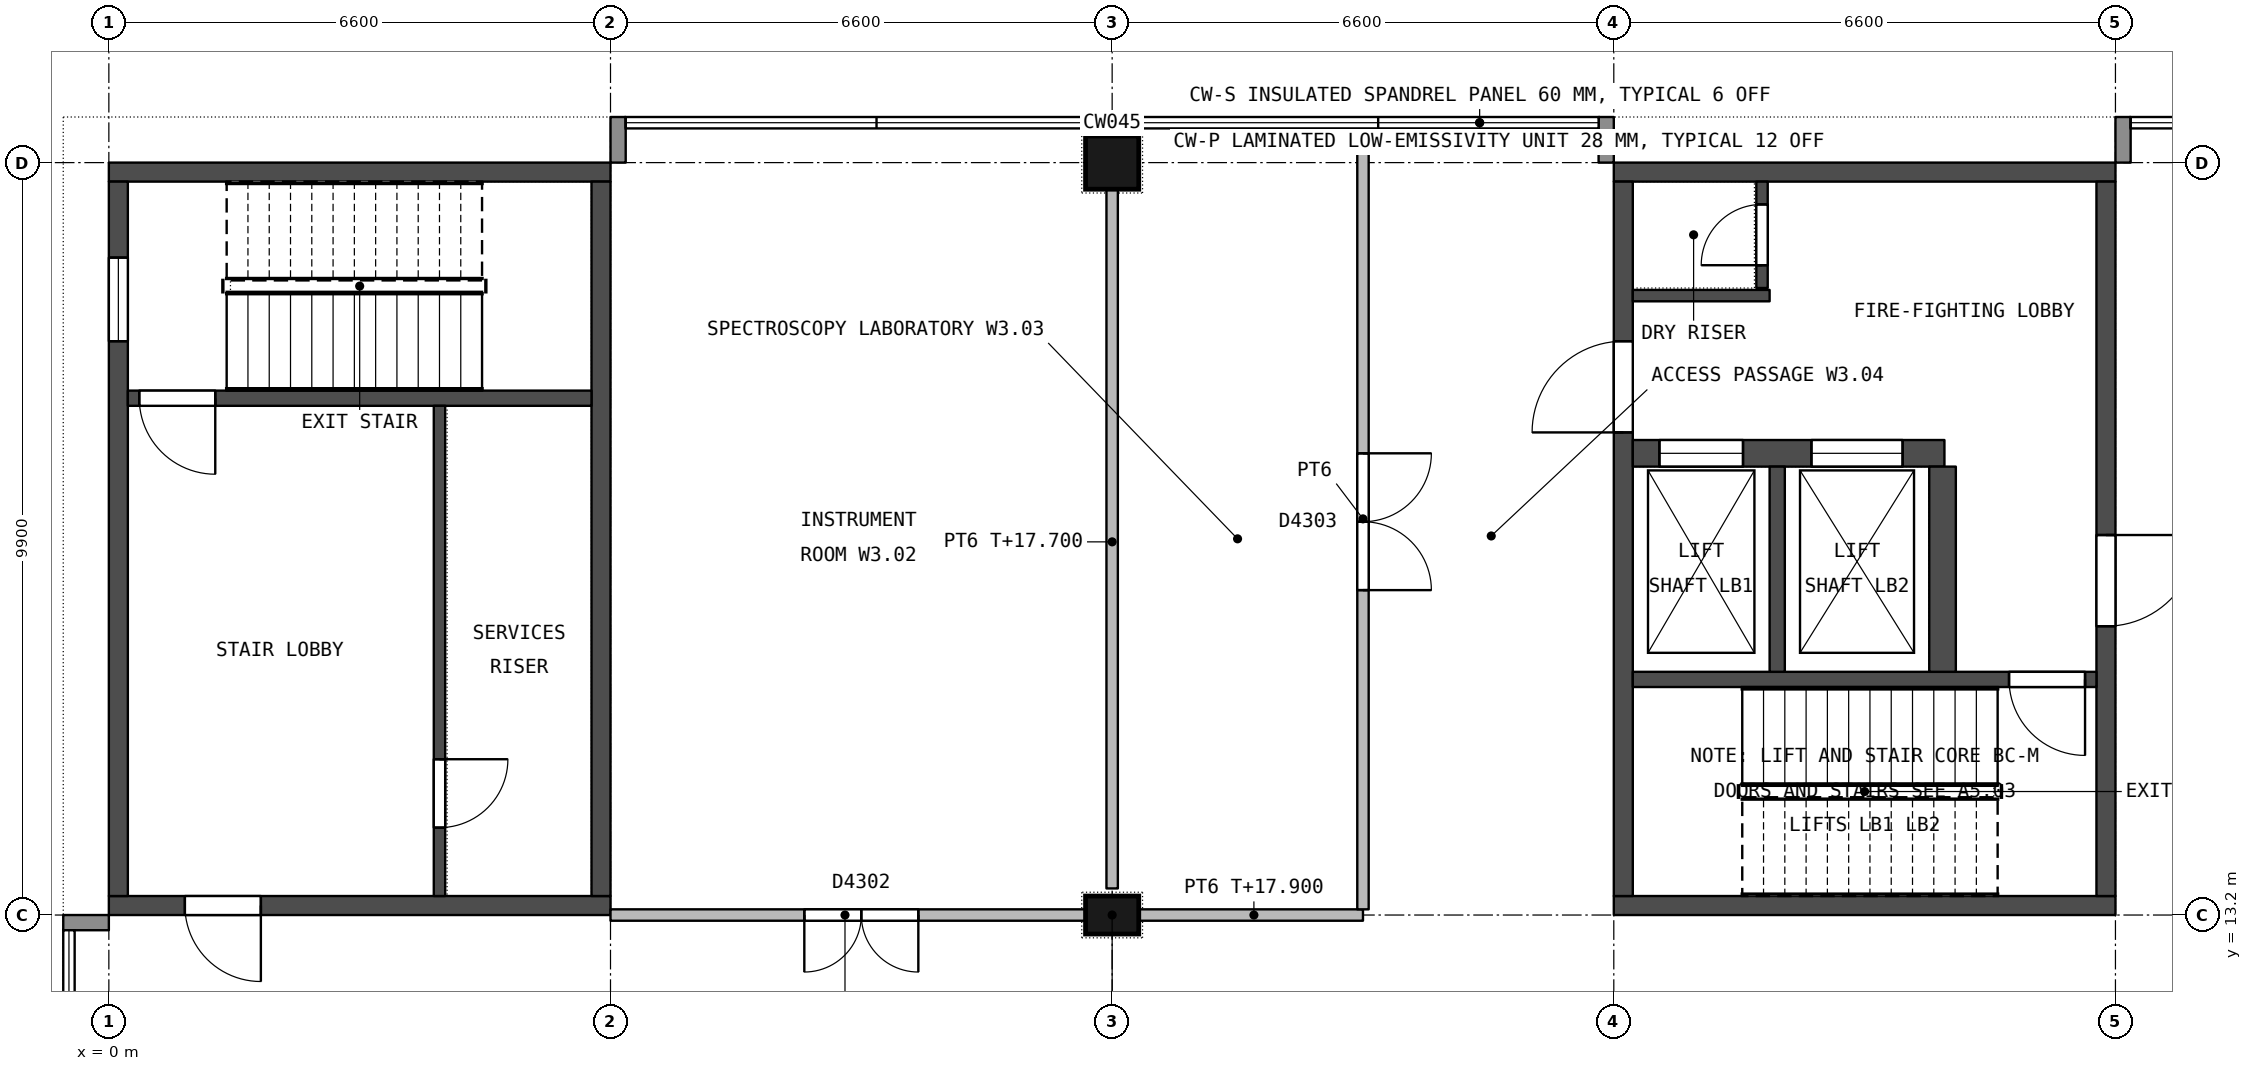
"""IFC4 building model, lengths in metres.
Left out: names, types, materials, properties, quantities, classifications, styles, units other than length and angle.
Written with IfcOpenShell. Run it as: python <this file> out.ifc"""

import sys

from ifc_helpers import new_model, si_unit, direction, frame, frame_2d, origin, origin_2d, place, context, subcontext, project, spatial, rectangle, extrude, element, fill, save


model = new_model("IFC4")
c1 = context("Model", 3, precision=1e-05, world=origin(), true_north=direction((0.0, 1.0)))
c2 = subcontext(c1, "Body", "Model", "MODEL_VIEW")
j1 = project(units=[si_unit("LENGTHUNIT", "METRE"), si_unit("PLANEANGLEUNIT", "RADIAN")], contexts=[c1])
p1 = place(None, origin())
s1 = spatial("IfcSite", under=j1, at=p1, CompositionType="ELEMENT")
p2 = place(p1, origin())
s2 = spatial("IfcBuilding", under=s1, at=p2, CompositionType="ELEMENT")
p3 = place(p2, frame((0.0, 0.0, 14.4)))
s3 = spatial("IfcBuildingStorey", under=s2, at=p3, CompositionType="ELEMENT", Elevation=14.4)
p4 = place(p3, frame((13.2, 13.2, 0.0), z_axis=(0.0, 0.0, 1.0), x_axis=(1.0, 0.0, 0.0)))
e1 = element("IfcColumn", 1, at=p4, inside=s3, PredefinedType="COLUMN", context=c2, shape_type="SweptSolid", body=[
    extrude(rectangle(XDim=0.7, YDim=0.5, at=origin_2d()), origin(), (0.0, 0.0, 1.0), 4.5),
])
p5 = place(p3, frame((13.2, 23.1, 0.0), z_axis=(0.0, 0.0, 1.0), x_axis=(1.0, 0.0, 0.0)))
e2 = element("IfcColumn", 2, at=p5, inside=s3, PredefinedType="COLUMN", context=c2, shape_type="SweptSolid", body=[
    extrude(rectangle(XDim=0.7, YDim=0.7, at=origin_2d()), origin(), (0.0, 0.0, 1.0), 4.5),
])
p6 = place(p3, frame((0.0, 13.325, 0.0), z_axis=(0.0, 0.0, 1.0), x_axis=(1.0, 0.0, 0.0)))
e3 = element("IfcWall", 3, at=p6, inside=s3, PredefinedType="SHEAR", context=c2, shape_type="SweptSolid", body=[
    extrude(rectangle(XDim=6.6, YDim=0.25, at=frame_2d((3.3, 0.0))), origin(), (0.0, 0.0, 1.0), 4.2),
])
p7 = place(p6, frame((1.0, 0.0, 0.0)))
e4 = element("IfcOpeningElement", 4, at=p7, cuts=e3, PredefinedType="OPENING", context=c2, shape_type="SweptSolid", body=[
    extrude(rectangle(XDim=1.0, YDim=2.1, at=frame_2d((0.5, 1.05))), frame((0.0, 0.135, 0.0), z_axis=(0.0, -1.0, 0.0), x_axis=(1.0, 0.0, 0.0)), (0.0, 0.0, 1.0), 0.27),
])
p8 = place(p3, frame((0.0, 22.975, 0.0), z_axis=(0.0, 0.0, 1.0), x_axis=(1.0, 0.0, 0.0)))
e5 = element("IfcWall", 5, at=p8, inside=s3, PredefinedType="SHEAR", context=c2, shape_type="SweptSolid", body=[
    extrude(rectangle(XDim=6.6, YDim=0.25, at=frame_2d((3.3, 0.0))), origin(), (0.0, 0.0, 1.0), 4.2),
])
p9 = place(p3, frame((0.125, 13.45, 0.0), z_axis=(0.0, 0.0, 1.0), x_axis=(0.0, 1.0, 0.0)))
e6 = element("IfcWall", 6, at=p9, inside=s3, PredefinedType="SHEAR", context=c2, shape_type="SweptSolid", body=[
    extrude(rectangle(XDim=9.4, YDim=0.25, at=frame_2d((4.7, 0.0))), origin(), (0.0, 0.0, 1.0), 4.2),
])
p10 = place(p9, frame((7.3, 0.0, 0.7)))
e7 = element("IfcOpeningElement", 7, at=p10, cuts=e6, PredefinedType="OPENING", context=c2, shape_type="SweptSolid", body=[
    extrude(rectangle(XDim=1.1, YDim=1.5, at=frame_2d((0.55, 0.75))), frame((0.0, 0.135, 0.0), z_axis=(0.0, -1.0, 0.0), x_axis=(1.0, 0.0, 0.0)), (0.0, 0.0, 1.0), 0.27),
])
p11 = place(p3, frame((6.475, 13.45, 0.0), z_axis=(0.0, 0.0, 1.0), x_axis=(0.0, 1.0, 0.0)))
e8 = element("IfcWall", 8, at=p11, inside=s3, PredefinedType="SHEAR", context=c2, shape_type="SweptSolid", body=[
    extrude(rectangle(XDim=9.4, YDim=0.25, at=frame_2d((4.7, 0.0))), origin(), (0.0, 0.0, 1.0), 4.2),
])
p12 = place(p3, frame((0.25, 20.0, 0.0), z_axis=(0.0, 0.0, 1.0), x_axis=(1.0, 0.0, 0.0)))
e9 = element("IfcWall", 9, at=p12, inside=s3, PredefinedType="SHEAR", context=c2, shape_type="SweptSolid", body=[
    extrude(rectangle(XDim=6.1, YDim=0.2, at=frame_2d((3.05, 0.0))), origin(), (0.0, 0.0, 1.0), 4.2),
])
p13 = place(p12, frame((0.15, 0.0, 0.0)))
e10 = element("IfcOpeningElement", 10, at=p13, cuts=e9, PredefinedType="OPENING", context=c2, shape_type="SweptSolid", body=[
    extrude(rectangle(XDim=1.0, YDim=2.1, at=frame_2d((0.5, 1.05))), frame((0.0, 0.11, 0.0), z_axis=(0.0, -1.0, 0.0), x_axis=(1.0, 0.0, 0.0)), (0.0, 0.0, 1.0), 0.22),
])
p14 = place(p3, frame((4.35, 13.45, 0.0), z_axis=(0.0, 0.0, 1.0), x_axis=(0.0, 1.0, 0.0)))
e11 = element("IfcWall", 11, at=p14, inside=s3, PredefinedType="SHEAR", context=c2, shape_type="SweptSolid", body=[
    extrude(rectangle(XDim=6.45, YDim=0.15, at=frame_2d((3.225, 0.0))), origin(), (0.0, 0.0, 1.0), 4.2),
])
p15 = place(p14, frame((0.9, 0.0, 0.0)))
e12 = element("IfcOpeningElement", 12, at=p15, cuts=e11, PredefinedType="OPENING", context=c2, shape_type="SweptSolid", body=[
    extrude(rectangle(XDim=0.9, YDim=2.1, at=frame_2d((0.45, 1.05))), frame((0.0, 0.085, 0.0), z_axis=(0.0, -1.0, 0.0), x_axis=(1.0, 0.0, 0.0)), (0.0, 0.0, 1.0), 0.17),
])
for number, where, z_axis, x_axis in (
    (13, (19.8, 13.325, 0.0), (0.0, 0.0, 1.0), (1.0, 0.0, 0.0)),
    (14, (19.8, 22.975, 0.0), (0.0, 0.0, 1.0), (1.0, 0.0, 0.0)),
):
    element("IfcWall", number, at=place(p3, frame(where, z_axis=z_axis, x_axis=x_axis)), inside=s3, PredefinedType="SHEAR", context=c2, shape_type="SweptSolid", body=[
        extrude(rectangle(XDim=6.6, YDim=0.25, at=frame_2d((3.3, 0.0))), origin(), (0.0, 0.0, 1.0), 4.2),
    ])
p16 = place(p3, frame((19.925, 13.45, 0.0), z_axis=(0.0, 0.0, 1.0), x_axis=(0.0, 1.0, 0.0)))
e15 = element("IfcWall", 15, at=p16, inside=s3, PredefinedType="SHEAR", context=c2, shape_type="SweptSolid", body=[
    extrude(rectangle(XDim=9.4, YDim=0.25, at=frame_2d((4.7, 0.0))), origin(), (0.0, 0.0, 1.0), 4.2),
])
p17 = place(p16, frame((6.1, 0.0, 0.0)))
e16 = element("IfcOpeningElement", 16, at=p17, cuts=e15, PredefinedType="OPENING", context=c2, shape_type="SweptSolid", body=[
    extrude(rectangle(XDim=1.2, YDim=2.1, at=frame_2d((0.6, 1.05))), frame((0.0, 0.135, 0.0), z_axis=(0.0, -1.0, 0.0), x_axis=(1.0, 0.0, 0.0)), (0.0, 0.0, 1.0), 0.27),
])
p18 = place(p3, frame((26.275, 13.45, 0.0), z_axis=(0.0, 0.0, 1.0), x_axis=(0.0, 1.0, 0.0)))
e17 = element("IfcWall", 17, at=p18, inside=s3, PredefinedType="SHEAR", context=c2, shape_type="SweptSolid", body=[
    extrude(rectangle(XDim=9.4, YDim=0.25, at=frame_2d((4.7, 0.0))), origin(), (0.0, 0.0, 1.0), 4.2),
])
p19 = place(p18, frame((3.55, 0.0, 0.0)))
e18 = element("IfcOpeningElement", 18, at=p19, cuts=e17, PredefinedType="OPENING", context=c2, shape_type="SweptSolid", body=[
    extrude(rectangle(XDim=1.2, YDim=2.1, at=frame_2d((0.6, 1.05))), frame((0.0, 0.135, 0.0), z_axis=(0.0, -1.0, 0.0), x_axis=(1.0, 0.0, 0.0)), (0.0, 0.0, 1.0), 0.27),
])
p20 = place(p3, frame((20.05, 16.3, 0.0), z_axis=(0.0, 0.0, 1.0), x_axis=(1.0, 0.0, 0.0)))
e19 = element("IfcWall", 19, at=p20, inside=s3, PredefinedType="SHEAR", context=c2, shape_type="SweptSolid", body=[
    extrude(rectangle(XDim=6.1, YDim=0.2, at=frame_2d((3.05, 0.0))), origin(), (0.0, 0.0, 1.0), 4.2),
])
p21 = place(p20, frame((4.95, 0.0, 0.0)))
e20 = element("IfcOpeningElement", 20, at=p21, cuts=e19, PredefinedType="OPENING", context=c2, shape_type="SweptSolid", body=[
    extrude(rectangle(XDim=1.0, YDim=2.2, at=frame_2d((0.5, 1.1))), frame((0.0, 0.11, 0.0), z_axis=(0.0, -1.0, 0.0), x_axis=(1.0, 0.0, 0.0)), (0.0, 0.0, 1.0), 0.22),
])
p22 = place(p3, frame((20.05, 19.275, 0.0), z_axis=(0.0, 0.0, 1.0), x_axis=(1.0, 0.0, 0.0)))
e21 = element("IfcWall", 21, at=p22, inside=s3, PredefinedType="SHEAR", context=c2, shape_type="SweptSolid", body=[
    extrude(rectangle(XDim=4.1, YDim=0.35, at=frame_2d((2.05, 0.0))), origin(), (0.0, 0.0, 1.0), 4.2),
])
p23 = place(p22, frame((0.35, 0.0, 0.0)))
e22 = element("IfcOpeningElement", 22, at=p23, cuts=e21, PredefinedType="OPENING", context=c2, shape_type="SweptSolid", body=[
    extrude(rectangle(XDim=1.1, YDim=2.2, at=frame_2d((0.55, 1.1))), frame((0.0, 0.185, 0.0), z_axis=(0.0, -1.0, 0.0), x_axis=(1.0, 0.0, 0.0)), (0.0, 0.0, 1.0), 0.37),
])
p24 = place(p22, frame((2.35, 0.0, 0.0)))
e23 = element("IfcOpeningElement", 23, at=p24, cuts=e21, PredefinedType="OPENING", context=c2, shape_type="SweptSolid", body=[
    extrude(rectangle(XDim=1.2, YDim=2.3, at=frame_2d((0.6, 1.15))), frame((0.0, 0.185, 0.0), z_axis=(0.0, -1.0, 0.0), x_axis=(1.0, 0.0, 0.0)), (0.0, 0.0, 1.0), 0.37),
])
p25 = place(p3, frame((21.95, 16.4, 0.0), z_axis=(0.0, 0.0, 1.0), x_axis=(0.0, 1.0, 0.0)))
e24 = element("IfcWall", 24, at=p25, inside=s3, PredefinedType="SHEAR", context=c2, shape_type="SweptSolid", body=[
    extrude(rectangle(XDim=2.7, YDim=0.2, at=frame_2d((1.35, 0.0))), origin(), (0.0, 0.0, 1.0), 4.2),
])
p26 = place(p3, frame((24.125, 16.4, 0.0), z_axis=(0.0, 0.0, 1.0), x_axis=(0.0, 1.0, 0.0)))
e25 = element("IfcWall", 25, at=p26, inside=s3, PredefinedType="SHEAR", context=c2, shape_type="SweptSolid", body=[
    extrude(rectangle(XDim=2.7, YDim=0.35, at=frame_2d((1.35, 0.0))), origin(), (0.0, 0.0, 1.0), 4.2),
])
p27 = place(p3, frame((20.05, 21.35, 0.0), z_axis=(0.0, 0.0, 1.0), x_axis=(1.0, 0.0, 0.0)))
e26 = element("IfcWall", 26, at=p27, inside=s3, PredefinedType="SHEAR", context=c2, shape_type="SweptSolid", body=[
    extrude(rectangle(XDim=1.8, YDim=0.15, at=frame_2d((0.9, 0.0))), origin(), (0.0, 0.0, 1.0), 4.2),
])
p28 = place(p3, frame((21.75, 21.45, 0.0), z_axis=(0.0, 0.0, 1.0), x_axis=(0.0, 1.0, 0.0)))
e27 = element("IfcWall", 27, at=p28, inside=s3, PredefinedType="SHEAR", context=c2, shape_type="SweptSolid", body=[
    extrude(rectangle(XDim=1.4, YDim=0.15, at=frame_2d((0.7, 0.0))), origin(), (0.0, 0.0, 1.0), 4.2),
])
p29 = place(p28, frame((0.3, 0.0, 0.0)))
e28 = element("IfcOpeningElement", 28, at=p29, cuts=e27, PredefinedType="OPENING", context=c2, shape_type="SweptSolid", body=[
    extrude(rectangle(XDim=0.8, YDim=2.0, at=frame_2d((0.4, 1.0))), frame((0.0, 0.085, 0.0), z_axis=(0.0, -1.0, 0.0), x_axis=(1.0, 0.0, 0.0)), (0.0, 0.0, 1.0), 0.17),
])
for number, where, z_axis, x_axis in (
    (29, (6.7, 23.1, 0.0), (0.0, 0.0, 1.0), (0.0, 1.0, 0.0)),
    (30, (19.7, 23.1, 0.0), (0.0, 0.0, 1.0), (0.0, 1.0, 0.0)),
    (31, (26.5, 23.1, 0.0), (0.0, 0.0, 1.0), (0.0, 1.0, 0.0)),
):
    element("IfcWall", number, at=place(p3, frame(where, z_axis=z_axis, x_axis=x_axis)), inside=s3, PredefinedType="STANDARD", context=c2, shape_type="SweptSolid", body=[
        extrude(rectangle(XDim=0.6, YDim=0.2, at=frame_2d((0.3, 0.0))), origin(), (0.0, 0.0, 1.0), 3.5),
    ])
p30 = place(p3, frame((0.0, 13.1, 0.0), z_axis=(0.0, 0.0, 1.0), x_axis=(-1.0, 0.0, 0.0)))
e32 = element("IfcWall", 32, at=p30, inside=s3, PredefinedType="STANDARD", context=c2, shape_type="SweptSolid", body=[
    extrude(rectangle(XDim=0.6, YDim=0.2, at=frame_2d((0.3, 0.0))), origin(), (0.0, 0.0, 1.0), 3.5),
])
p31 = place(p3, frame((12.85, 13.2, 0.0), z_axis=(0.0, 0.0, 1.0), x_axis=(-1.0, 0.0, 0.0)))
e33 = element("IfcWall", 33, at=p31, inside=s3, PredefinedType="PARTITIONING", context=c2, shape_type="SweptSolid", body=[
    extrude(rectangle(XDim=6.25, YDim=0.15, at=frame_2d((3.125, 0.0))), origin(), (0.0, 0.0, 1.0), 3.5),
])
p32 = place(p31, frame((2.2, 0.0, 0.0)))
e34 = element("IfcOpeningElement", 34, at=p32, cuts=e33, PredefinedType="OPENING", context=c2, shape_type="SweptSolid", body=[
    extrude(rectangle(XDim=1.5, YDim=2.1, at=frame_2d((0.75, 1.05))), frame((0.0, 0.085, 0.0), z_axis=(0.0, -1.0, 0.0), x_axis=(1.0, 0.0, 0.0)), (0.0, 0.0, 1.0), 0.17),
])
p33 = place(p3, frame((16.5, 13.2, 0.0), z_axis=(0.0, 0.0, 1.0), x_axis=(-1.0, 0.0, 0.0)))
e35 = element("IfcWall", 35, at=p33, inside=s3, PredefinedType="PARTITIONING", context=c2, shape_type="SweptSolid", body=[
    extrude(rectangle(XDim=2.95, YDim=0.15, at=frame_2d((1.475, 0.0))), origin(), (0.0, 0.0, 1.0), 3.5),
])
p34 = place(p3, frame((13.2, 13.55, 0.0), z_axis=(0.0, 0.0, 1.0), x_axis=(0.0, 1.0, 0.0)))
e36 = element("IfcWall", 36, at=p34, inside=s3, PredefinedType="PARTITIONING", context=c2, shape_type="SweptSolid", body=[
    extrude(rectangle(XDim=9.2, YDim=0.15, at=frame_2d((4.6, 0.0))), origin(), (0.0, 0.0, 1.0), 3.3),
])
p35 = place(p3, frame((16.5, 23.55, 0.0), z_axis=(0.0, 0.0, 1.0), x_axis=(0.0, -1.0, 0.0)))
e37 = element("IfcWall", 37, at=p35, inside=s3, PredefinedType="PARTITIONING", context=c2, shape_type="SweptSolid", body=[
    extrude(rectangle(XDim=10.275, YDim=0.15, at=frame_2d((5.138, 0.0))), origin(), (0.0, 0.0, 1.0), 4.2),
])
p36 = place(p35, frame((4.275, 0.0, 0.0)))
e38 = element("IfcOpeningElement", 38, at=p36, cuts=e37, PredefinedType="OPENING", context=c2, shape_type="SweptSolid", body=[
    extrude(rectangle(XDim=1.8, YDim=2.4, at=frame_2d((0.9, 1.2))), frame((0.0, 0.085, 0.0), z_axis=(0.0, -1.0, 0.0), x_axis=(1.0, 0.0, 0.0)), (0.0, 0.0, 1.0), 0.17),
])
p37 = place(p15, origin())
e39 = element("IfcDoor", 39, at=p37, inside=s3, OperationType="SINGLE_SWING_RIGHT", PredefinedType="DOOR", context=c2, shape_type="SweptSolid", body=[
    extrude(rectangle(XDim=0.9, YDim=2.1, at=frame_2d((0.45, 1.05))), frame((0.0, 0.025, 0.0), z_axis=(0.0, -1.0, 0.0), x_axis=(1.0, 0.0, 0.0)), (0.0, 0.0, 1.0), 0.05),
])
fill(e12, e39)
p38 = place(p7, origin())
e40 = element("IfcDoor", 40, at=p38, inside=s3, OperationType="SINGLE_SWING_RIGHT", PredefinedType="DOOR", context=c2, shape_type="SweptSolid", body=[
    extrude(rectangle(XDim=1.0, YDim=2.1, at=frame_2d((0.5, 1.05))), frame((0.0, 0.025, 0.0), z_axis=(0.0, -1.0, 0.0), x_axis=(1.0, 0.0, 0.0)), (0.0, 0.0, 1.0), 0.05),
])
fill(e4, e40)
p39 = place(p13, origin())
e41 = element("IfcDoor", 41, at=p39, inside=s3, OperationType="SINGLE_SWING_RIGHT", PredefinedType="DOOR", context=c2, shape_type="SweptSolid", body=[
    extrude(rectangle(XDim=1.0, YDim=2.1, at=frame_2d((0.5, 1.05))), frame((0.0, 0.025, 0.0), z_axis=(0.0, -1.0, 0.0), x_axis=(1.0, 0.0, 0.0)), (0.0, 0.0, 1.0), 0.05),
])
fill(e10, e41)
p40 = place(p10, origin())
e42 = element("IfcWindow", 42, at=p40, inside=s3, PartitioningType="SINGLE_PANEL", PredefinedType="WINDOW", context=c2, shape_type="SweptSolid", body=[
    extrude(rectangle(XDim=1.1, YDim=1.5, at=frame_2d((0.55, 0.75))), frame((0.0, 0.03, 0.0), z_axis=(0.0, -1.0, 0.0), x_axis=(1.0, 0.0, 0.0)), (0.0, 0.0, 1.0), 0.06),
])
fill(e7, e42)
p41 = place(p19, origin())
e43 = element("IfcDoor", 43, at=p41, inside=s3, OperationType="SINGLE_SWING_RIGHT", PredefinedType="DOOR", context=c2, shape_type="SweptSolid", body=[
    extrude(rectangle(XDim=1.2, YDim=2.1, at=frame_2d((0.6, 1.05))), frame((0.0, 0.025, 0.0), z_axis=(0.0, -1.0, 0.0), x_axis=(1.0, 0.0, 0.0)), (0.0, 0.0, 1.0), 0.05),
])
fill(e18, e43)
p42 = place(p17, origin())
e44 = element("IfcDoor", 44, at=p42, inside=s3, OperationType="SINGLE_SWING_LEFT", PredefinedType="DOOR", context=c2, shape_type="SweptSolid", body=[
    extrude(rectangle(XDim=1.2, YDim=2.1, at=frame_2d((0.6, 1.05))), frame((0.0, 0.025, 0.0), z_axis=(0.0, -1.0, 0.0), x_axis=(1.0, 0.0, 0.0)), (0.0, 0.0, 1.0), 0.05),
])
fill(e16, e44)
p43 = place(p21, origin())
e45 = element("IfcDoor", 45, at=p43, inside=s3, OperationType="SINGLE_SWING_RIGHT", PredefinedType="DOOR", context=c2, shape_type="SweptSolid", body=[
    extrude(rectangle(XDim=1.0, YDim=2.2, at=frame_2d((0.5, 1.1))), frame((0.0, 0.025, 0.0), z_axis=(0.0, -1.0, 0.0), x_axis=(1.0, 0.0, 0.0)), (0.0, 0.0, 1.0), 0.05),
])
fill(e20, e45)
p44 = place(p29, origin())
e46 = element("IfcDoor", 46, at=p44, inside=s3, OperationType="SINGLE_SWING_LEFT", PredefinedType="DOOR", context=c2, shape_type="SweptSolid", body=[
    extrude(rectangle(XDim=0.8, YDim=2.0, at=frame_2d((0.4, 1.0))), frame((0.0, 0.025, 0.0), z_axis=(0.0, -1.0, 0.0), x_axis=(1.0, 0.0, 0.0)), (0.0, 0.0, 1.0), 0.05),
])
fill(e28, e46)
p45 = place(p23, origin())
e47 = element("IfcDoor", 47, at=p45, inside=s3, OperationType="DOUBLE_DOOR_SLIDING", PredefinedType="NOTDEFINED", context=c2, shape_type="SweptSolid", body=[
    extrude(rectangle(XDim=1.1, YDim=2.2, at=frame_2d((0.55, 1.1))), frame((0.0, 0.025, 0.0), z_axis=(0.0, -1.0, 0.0), x_axis=(1.0, 0.0, 0.0)), (0.0, 0.0, 1.0), 0.05),
])
fill(e22, e47)
p46 = place(p24, origin())
e48 = element("IfcDoor", 48, at=p46, inside=s3, OperationType="DOUBLE_DOOR_SLIDING", PredefinedType="NOTDEFINED", context=c2, shape_type="SweptSolid", body=[
    extrude(rectangle(XDim=1.2, YDim=2.3, at=frame_2d((0.6, 1.15))), frame((0.0, 0.025, 0.0), z_axis=(0.0, -1.0, 0.0), x_axis=(1.0, 0.0, 0.0)), (0.0, 0.0, 1.0), 0.05),
])
fill(e23, e48)
p47 = place(p32, origin())
e49 = element("IfcDoor", 49, at=p47, inside=s3, OperationType="DOUBLE_DOOR_SINGLE_SWING", PredefinedType="DOOR", context=c2, shape_type="SweptSolid", body=[
    extrude(rectangle(XDim=1.5, YDim=2.1, at=frame_2d((0.75, 1.05))), frame((0.0, 0.027, 0.0), z_axis=(0.0, -1.0, 0.0), x_axis=(1.0, 0.0, 0.0)), (0.0, 0.0, 1.0), 0.054),
])
fill(e34, e49)
p48 = place(p36, origin())
e50 = element("IfcDoor", 50, at=p48, inside=s3, OperationType="DOUBLE_DOOR_SINGLE_SWING", PredefinedType="DOOR", context=c2, shape_type="SweptSolid", body=[
    extrude(rectangle(XDim=1.8, YDim=2.4, at=frame_2d((0.9, 1.2))), frame((0.0, 0.027, 0.0), z_axis=(0.0, -1.0, 0.0), x_axis=(1.0, 0.0, 0.0)), (0.0, 0.0, 1.0), 0.054),
])
fill(e38, e50)
save(model, sys.argv[1])
